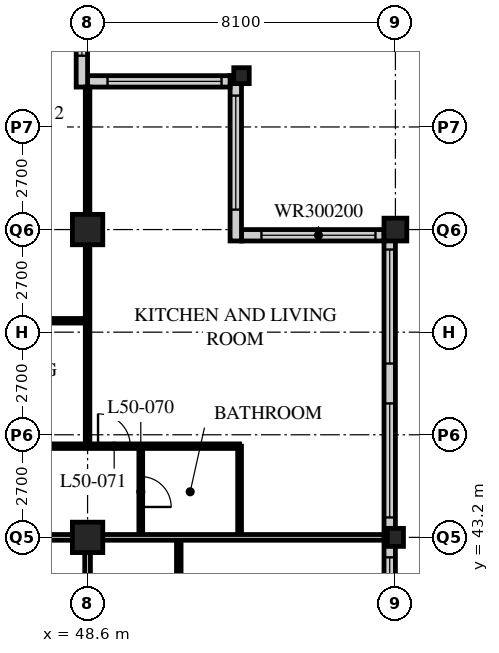
"""IFC4 building model, lengths in metres.
Left out: names, types, materials, properties, quantities, classifications, styles, units other than length and angle.
Written with IfcOpenShell. Run it as: python <this file> out.ifc"""

import sys

from ifc_helpers import new_model, si_unit, direction, frame, frame_2d, origin, origin_2d, place, context, subcontext, project, spatial, rectangle, hollow_rectangle, i_section, extrude, element, fill, save


model = new_model("IFC4")
c1 = context("Model", 3, precision=1e-05, world=origin(), true_north=direction((0.0, 1.0)))
c2 = subcontext(c1, "Body", "Model", "MODEL_VIEW")
j1 = project(units=[si_unit("LENGTHUNIT", "METRE"), si_unit("PLANEANGLEUNIT", "RADIAN")], contexts=[c1])
p1 = place(None, origin())
s1 = spatial("IfcSite", under=j1, at=p1, CompositionType="ELEMENT")
p2 = place(p1, origin())
s2 = spatial("IfcBuilding", under=s1, at=p2, CompositionType="ELEMENT")
p3 = place(p2, frame((0.0, 0.0, 195.6)))
s3 = spatial("IfcBuildingStorey", under=s2, at=p3, CompositionType="ELEMENT", Elevation=195.6)
for number, where, z_axis, x_axis in (
    (1, (48.6, 43.2, 0.0), (0.0, 0.0, 1.0), (1.0, 0.0, 0.0)),
    (2, (48.6, 51.3, 0.0), (0.0, 0.0, 1.0), (1.0, 0.0, 0.0)),
):
    element("IfcColumn", number, at=place(p3, frame(where, z_axis=z_axis, x_axis=x_axis)), inside=s3, PredefinedType="COLUMN", context=c2, shape_type="SweptSolid", body=[
        extrude(hollow_rectangle(XDim=0.8, YDim=0.8, WallThickness=0.08, at=origin_2d()), origin(), (0.0, 0.0, 1.0), 3.6),
    ])
p4 = place(p3, frame((52.65, 55.35, 0.0), z_axis=(0.0, 0.0, 1.0), x_axis=(1.0, 0.0, 0.0)))
e3 = element("IfcColumn", 3, at=p4, inside=s3, PredefinedType="COLUMN", context=c2, shape_type="SweptSolid", body=[
    extrude(i_section(OverallWidth=0.407, OverallDepth=0.419, WebThickness=0.031, FlangeThickness=0.049, FilletRadius=0.015, at=origin_2d()), origin(), (0.0, 0.0, 1.0), 3.6),
])
p5 = place(p3, frame((56.7, 43.2, 0.0), z_axis=(0.0, 0.0, 1.0), x_axis=(1.0, 0.0, 0.0)))
e4 = element("IfcColumn", 4, at=p5, inside=s3, PredefinedType="COLUMN", context=c2, shape_type="SweptSolid", body=[
    extrude(i_section(OverallWidth=0.424, OverallDepth=0.475, WebThickness=0.048, FlangeThickness=0.077, FilletRadius=0.015, at=origin_2d()), origin(), (0.0, 0.0, 1.0), 3.6),
])
p6 = place(p3, frame((56.7, 51.3, 0.0), z_axis=(0.0, 0.0, 1.0), x_axis=(1.0, 0.0, 0.0)))
e5 = element("IfcColumn", 5, at=p6, inside=s3, PredefinedType="COLUMN", context=c2, shape_type="SweptSolid", body=[
    extrude(hollow_rectangle(XDim=0.6, YDim=0.6, WallThickness=0.05, at=origin_2d()), origin(), (0.0, 0.0, 1.0), 3.6),
])
p7 = place(p3, frame((56.55, 19.2, 0.0), z_axis=(0.0, 0.0, 1.0), x_axis=(0.0, 1.0, 0.0)))
e6 = element("IfcWall", 6, at=p7, inside=s3, PredefinedType="SOLIDWALL", context=c2, shape_type="SweptSolid", body=[
    extrude(rectangle(XDim=32.1, YDim=0.3, at=frame_2d((16.05, 0.0))), origin(), (0.0, 0.0, 1.0), 3.39),
])
p8 = place(p7, frame((0.225, 0.0, 0.6)))
e7 = element("IfcOpeningElement", 7, at=p8, cuts=e6, PredefinedType="OPENING", context=c2, shape_type="SweptSolid", body=[
    extrude(rectangle(XDim=3.0, YDim=2.4, at=frame_2d((1.5, 1.2))), frame((0.0, 0.16, 0.0), z_axis=(0.0, -1.0, 0.0), x_axis=(1.0, 0.0, 0.0)), (0.0, 0.0, 1.0), 0.32),
])
p9 = place(p7, frame((4.275, 0.0, 0.6)))
e8 = element("IfcOpeningElement", 8, at=p9, cuts=e6, PredefinedType="OPENING", context=c2, shape_type="SweptSolid", body=[
    extrude(rectangle(XDim=3.0, YDim=2.4, at=frame_2d((1.5, 1.2))), frame((0.0, 0.16, 0.0), z_axis=(0.0, -1.0, 0.0), x_axis=(1.0, 0.0, 0.0)), (0.0, 0.0, 1.0), 0.32),
])
p10 = place(p7, frame((8.325, 0.0, 0.6)))
e9 = element("IfcOpeningElement", 9, at=p10, cuts=e6, PredefinedType="OPENING", context=c2, shape_type="SweptSolid", body=[
    extrude(rectangle(XDim=3.0, YDim=2.4, at=frame_2d((1.5, 1.2))), frame((0.0, 0.16, 0.0), z_axis=(0.0, -1.0, 0.0), x_axis=(1.0, 0.0, 0.0)), (0.0, 0.0, 1.0), 0.32),
])
p11 = place(p7, frame((12.375, 0.0, 0.6)))
e10 = element("IfcOpeningElement", 10, at=p11, cuts=e6, PredefinedType="OPENING", context=c2, shape_type="SweptSolid", body=[
    extrude(rectangle(XDim=3.0, YDim=2.4, at=frame_2d((1.5, 1.2))), frame((0.0, 0.16, 0.0), z_axis=(0.0, -1.0, 0.0), x_axis=(1.0, 0.0, 0.0)), (0.0, 0.0, 1.0), 0.32),
])
p12 = place(p7, frame((16.425, 0.0, 0.6)))
e11 = element("IfcOpeningElement", 11, at=p12, cuts=e6, PredefinedType="OPENING", context=c2, shape_type="SweptSolid", body=[
    extrude(rectangle(XDim=3.0, YDim=2.4, at=frame_2d((1.5, 1.2))), frame((0.0, 0.16, 0.0), z_axis=(0.0, -1.0, 0.0), x_axis=(1.0, 0.0, 0.0)), (0.0, 0.0, 1.0), 0.32),
])
p13 = place(p7, frame((20.475, 0.0, 0.6)))
e12 = element("IfcOpeningElement", 12, at=p13, cuts=e6, PredefinedType="OPENING", context=c2, shape_type="SweptSolid", body=[
    extrude(rectangle(XDim=3.0, YDim=2.4, at=frame_2d((1.5, 1.2))), frame((0.0, 0.16, 0.0), z_axis=(0.0, -1.0, 0.0), x_axis=(1.0, 0.0, 0.0)), (0.0, 0.0, 1.0), 0.32),
])
p14 = place(p7, frame((24.525, 0.0, 0.6)))
e13 = element("IfcOpeningElement", 13, at=p14, cuts=e6, PredefinedType="OPENING", context=c2, shape_type="SweptSolid", body=[
    extrude(rectangle(XDim=3.0, YDim=2.4, at=frame_2d((1.5, 1.2))), frame((0.0, 0.16, 0.0), z_axis=(0.0, -1.0, 0.0), x_axis=(1.0, 0.0, 0.0)), (0.0, 0.0, 1.0), 0.32),
])
p15 = place(p7, frame((28.575, 0.0, 0.6)))
e14 = element("IfcOpeningElement", 14, at=p15, cuts=e6, PredefinedType="OPENING", context=c2, shape_type="SweptSolid", body=[
    extrude(rectangle(XDim=3.0, YDim=2.4, at=frame_2d((1.5, 1.2))), frame((0.0, 0.16, 0.0), z_axis=(0.0, -1.0, 0.0), x_axis=(1.0, 0.0, 0.0)), (0.0, 0.0, 1.0), 0.32),
])
p16 = place(p3, frame((56.4, 51.15, 0.0), z_axis=(0.0, 0.0, 1.0), x_axis=(-1.0, 0.0, 0.0)))
e15 = element("IfcWall", 15, at=p16, inside=s3, PredefinedType="SOLIDWALL", context=c2, shape_type="SweptSolid", body=[
    extrude(rectangle(XDim=3.75, YDim=0.3, at=frame_2d((1.875, 0.0))), origin(), (0.0, 0.0, 1.0), 3.39),
])
p17 = place(p16, frame((0.225, 0.0, 0.6)))
e16 = element("IfcOpeningElement", 16, at=p17, cuts=e15, PredefinedType="OPENING", context=c2, shape_type="SweptSolid", body=[
    extrude(rectangle(XDim=3.0, YDim=2.0, at=frame_2d((1.5, 1.0))), frame((0.0, 0.16, 0.0), z_axis=(0.0, -1.0, 0.0), x_axis=(1.0, 0.0, 0.0)), (0.0, 0.0, 1.0), 0.32),
])
p18 = place(p3, frame((52.5, 51.0, 0.0), z_axis=(0.0, 0.0, 1.0), x_axis=(0.0, 1.0, 0.0)))
e17 = element("IfcWall", 17, at=p18, inside=s3, PredefinedType="SOLIDWALL", context=c2, shape_type="SweptSolid", body=[
    extrude(rectangle(XDim=4.35, YDim=0.3, at=frame_2d((2.175, 0.0))), origin(), (0.0, 0.0, 1.0), 3.39),
])
p19 = place(p18, frame((0.825, 0.0, 0.6)))
e18 = element("IfcOpeningElement", 18, at=p19, cuts=e17, PredefinedType="OPENING", context=c2, shape_type="SweptSolid", body=[
    extrude(rectangle(XDim=3.0, YDim=2.0, at=frame_2d((1.5, 1.0))), frame((0.0, 0.16, 0.0), z_axis=(0.0, -1.0, 0.0), x_axis=(1.0, 0.0, 0.0)), (0.0, 0.0, 1.0), 0.32),
])
p20 = place(p3, frame((52.35, 55.2, 0.0), z_axis=(0.0, 0.0, 1.0), x_axis=(-1.0, 0.0, 0.0)))
e19 = element("IfcWall", 19, at=p20, inside=s3, PredefinedType="SOLIDWALL", context=c2, shape_type="SweptSolid", body=[
    extrude(rectangle(XDim=3.75, YDim=0.3, at=frame_2d((1.875, 0.0))), origin(), (0.0, 0.0, 1.0), 3.39),
])
p21 = place(p20, frame((0.225, 0.0, 0.6)))
e20 = element("IfcOpeningElement", 20, at=p21, cuts=e19, PredefinedType="OPENING", context=c2, shape_type="SweptSolid", body=[
    extrude(rectangle(XDim=3.0, YDim=2.0, at=frame_2d((1.5, 1.0))), frame((0.0, 0.16, 0.0), z_axis=(0.0, -1.0, 0.0), x_axis=(1.0, 0.0, 0.0)), (0.0, 0.0, 1.0), 0.32),
])
p22 = place(p3, frame((48.45, 55.05, 0.0), z_axis=(0.0, 0.0, 1.0), x_axis=(0.0, 1.0, 0.0)))
e21 = element("IfcWall", 21, at=p22, inside=s3, PredefinedType="SOLIDWALL", context=c2, shape_type="SweptSolid", body=[
    extrude(rectangle(XDim=4.35, YDim=0.3, at=frame_2d((2.175, 0.0))), origin(), (0.0, 0.0, 1.0), 3.39),
])
p23 = place(p22, frame((0.825, 0.0, 0.6)))
e22 = element("IfcOpeningElement", 22, at=p23, cuts=e21, PredefinedType="OPENING", context=c2, shape_type="SweptSolid", body=[
    extrude(rectangle(XDim=3.0, YDim=2.0, at=frame_2d((1.5, 1.0))), frame((0.0, 0.16, 0.0), z_axis=(0.0, -1.0, 0.0), x_axis=(1.0, 0.0, 0.0)), (0.0, 0.0, 1.0), 0.32),
])
p24 = place(p3, frame((8.1, 43.2, 0.0), z_axis=(0.0, 0.0, 1.0), x_axis=(1.0, 0.0, 0.0)))
e23 = element("IfcWall", 23, at=p24, inside=s3, PredefinedType="PARTITIONING", context=c2, shape_type="SweptSolid", body=[
    extrude(rectangle(XDim=40.5, YDim=0.15, at=frame_2d((20.25, 0.0))), origin(), (0.0, 0.0, 1.0), 2.778),
])
p25 = place(p24, frame((4.45, 0.0, 0.0)))
e24 = element("IfcOpeningElement", 24, at=p25, cuts=e23, PredefinedType="OPENING", context=c2, shape_type="SweptSolid", body=[
    extrude(rectangle(XDim=1.0, YDim=2.1, at=frame_2d((0.5, 1.05))), frame((0.0, 0.085, 0.0), z_axis=(0.0, -1.0, 0.0), x_axis=(1.0, 0.0, 0.0)), (0.0, 0.0, 1.0), 0.17),
])
p26 = place(p24, frame((20.65, 0.0, 0.0)))
e25 = element("IfcOpeningElement", 25, at=p26, cuts=e23, PredefinedType="OPENING", context=c2, shape_type="SweptSolid", body=[
    extrude(rectangle(XDim=1.0, YDim=2.1, at=frame_2d((0.5, 1.05))), frame((0.0, 0.085, 0.0), z_axis=(0.0, -1.0, 0.0), x_axis=(1.0, 0.0, 0.0)), (0.0, 0.0, 1.0), 0.17),
])
p27 = place(p24, frame((28.75, 0.0, 0.0)))
e26 = element("IfcOpeningElement", 26, at=p27, cuts=e23, PredefinedType="OPENING", context=c2, shape_type="SweptSolid", body=[
    extrude(rectangle(XDim=1.0, YDim=2.1, at=frame_2d((0.5, 1.05))), frame((0.0, 0.085, 0.0), z_axis=(0.0, -1.0, 0.0), x_axis=(1.0, 0.0, 0.0)), (0.0, 0.0, 1.0), 0.17),
])
p28 = place(p24, frame((37.975, 0.0, 0.0)))
e27 = element("IfcOpeningElement", 27, at=p28, cuts=e23, PredefinedType="OPENING", context=c2, shape_type="SweptSolid", body=[
    extrude(rectangle(XDim=1.0, YDim=2.1, at=frame_2d((0.5, 1.05))), frame((0.0, 0.085, 0.0), z_axis=(0.0, -1.0, 0.0), x_axis=(1.0, 0.0, 0.0)), (0.0, 0.0, 1.0), 0.17),
])
p29 = place(p24, frame((1.525, 0.0, 0.0)))
e28 = element("IfcOpeningElement", 28, at=p29, cuts=e23, PredefinedType="OPENING", context=c2, shape_type="SweptSolid", body=[
    extrude(rectangle(XDim=1.0, YDim=2.1, at=frame_2d((0.5, 1.05))), frame((0.0, 0.085, 0.0), z_axis=(0.0, -1.0, 0.0), x_axis=(1.0, 0.0, 0.0)), (0.0, 0.0, 1.0), 0.17),
])
p30 = place(p3, frame((48.6, 18.9, 0.0), z_axis=(0.0, 0.0, 1.0), x_axis=(0.0, 1.0, 0.0)))
e29 = element("IfcWall", 29, at=p30, inside=s3, PredefinedType="PARTITIONING", context=c2, shape_type="SweptSolid", body=[
    extrude(rectangle(XDim=24.3, YDim=0.15, at=frame_2d((12.15, 0.0))), origin(), (0.0, 0.0, 1.0), 2.778),
])
p31 = place(p30, frame((2.35, 0.0, 0.0)))
e30 = element("IfcOpeningElement", 30, at=p31, cuts=e29, PredefinedType="OPENING", context=c2, shape_type="SweptSolid", body=[
    extrude(rectangle(XDim=1.0, YDim=2.1, at=frame_2d((0.5, 1.05))), frame((0.0, 0.085, 0.0), z_axis=(0.0, -1.0, 0.0), x_axis=(1.0, 0.0, 0.0)), (0.0, 0.0, 1.0), 0.17),
])
p32 = place(p30, frame((4.75, 0.0, 0.0)))
e31 = element("IfcOpeningElement", 31, at=p32, cuts=e29, PredefinedType="OPENING", context=c2, shape_type="SweptSolid", body=[
    extrude(rectangle(XDim=1.0, YDim=2.1, at=frame_2d((0.5, 1.05))), frame((0.0, 0.085, 0.0), z_axis=(0.0, -1.0, 0.0), x_axis=(1.0, 0.0, 0.0)), (0.0, 0.0, 1.0), 0.17),
])
p33 = place(p30, frame((9.0, 0.0, 0.0)))
e32 = element("IfcOpeningElement", 32, at=p33, cuts=e29, PredefinedType="OPENING", context=c2, shape_type="SweptSolid", body=[
    extrude(rectangle(XDim=1.0, YDim=2.1, at=frame_2d((0.5, 1.05))), frame((0.0, 0.085, 0.0), z_axis=(0.0, -1.0, 0.0), x_axis=(1.0, 0.0, 0.0)), (0.0, 0.0, 1.0), 0.17),
])
p34 = place(p3, frame((51.0, 27.0, 0.0), z_axis=(0.0, 0.0, 1.0), x_axis=(0.0, 1.0, 0.0)))
e33 = element("IfcWall", 33, at=p34, inside=s3, PredefinedType="PARTITIONING", context=c2, shape_type="SweptSolid", body=[
    extrude(rectangle(XDim=16.2, YDim=0.12, at=frame_2d((8.1, 0.0))), origin(), (0.0, 0.0, 1.0), 3.39),
])
p35 = place(p34, frame((0.975, 0.0, 0.0)))
e34 = element("IfcOpeningElement", 34, at=p35, cuts=e33, PredefinedType="OPENING", context=c2, shape_type="SweptSolid", body=[
    extrude(rectangle(XDim=0.85, YDim=2.1, at=frame_2d((0.425, 1.05))), frame((0.0, 0.07, 0.0), z_axis=(0.0, -1.0, 0.0), x_axis=(1.0, 0.0, 0.0)), (0.0, 0.0, 1.0), 0.14),
])
p36 = place(p34, frame((8.425, 0.0, 0.0)))
e35 = element("IfcOpeningElement", 35, at=p36, cuts=e33, PredefinedType="OPENING", context=c2, shape_type="SweptSolid", body=[
    extrude(rectangle(XDim=0.85, YDim=2.1, at=frame_2d((0.425, 1.05))), frame((0.0, 0.07, 0.0), z_axis=(0.0, -1.0, 0.0), x_axis=(1.0, 0.0, 0.0)), (0.0, 0.0, 1.0), 0.14),
])
p37 = place(p34, frame((12.475, 0.0, 0.0)))
e36 = element("IfcOpeningElement", 36, at=p37, cuts=e33, PredefinedType="OPENING", context=c2, shape_type="SweptSolid", body=[
    extrude(rectangle(XDim=0.85, YDim=2.1, at=frame_2d((0.425, 1.05))), frame((0.0, 0.07, 0.0), z_axis=(0.0, -1.0, 0.0), x_axis=(1.0, 0.0, 0.0)), (0.0, 0.0, 1.0), 0.14),
])
p38 = place(p3, frame((50.0, 43.2, 0.0), z_axis=(0.0, 0.0, 1.0), x_axis=(0.0, 1.0, 0.0)))
e37 = element("IfcWall", 37, at=p38, inside=s3, PredefinedType="PARTITIONING", context=c2, shape_type="SweptSolid", body=[
    extrude(rectangle(XDim=2.4, YDim=0.1, at=frame_2d((1.2, 0.0))), origin(), (0.0, 0.0, 1.0), 3.39),
])
p39 = place(p38, frame((0.8, 0.0, 0.0)))
e38 = element("IfcOpeningElement", 38, at=p39, cuts=e37, PredefinedType="OPENING", context=c2, shape_type="SweptSolid", body=[
    extrude(rectangle(XDim=0.8, YDim=2.1, at=frame_2d((0.4, 1.05))), frame((0.0, 0.06, 0.0), z_axis=(0.0, -1.0, 0.0), x_axis=(1.0, 0.0, 0.0)), (0.0, 0.0, 1.0), 0.12),
])
p40 = place(p3, frame((52.6, 43.2, 0.0), z_axis=(0.0, 0.0, 1.0), x_axis=(0.0, 1.0, 0.0)))
e39 = element("IfcWall", 39, at=p40, inside=s3, PredefinedType="PARTITIONING", context=c2, shape_type="SweptSolid", body=[
    extrude(rectangle(XDim=2.4, YDim=0.1, at=frame_2d((1.2, 0.0))), origin(), (0.0, 0.0, 1.0), 3.39),
])
p41 = place(p3, frame((48.6, 45.6, 0.0), z_axis=(0.0, 0.0, 1.0), x_axis=(0.0, 1.0, 0.0)))
e40 = element("IfcWall", 40, at=p41, inside=s3, PredefinedType="PARTITIONING", context=c2, shape_type="SweptSolid", body=[
    extrude(rectangle(XDim=9.45, YDim=0.12, at=frame_2d((4.725, 0.0))), origin(), (0.0, 0.0, 1.0), 2.778),
])
p42 = place(p3, frame((48.6, 43.2, 0.0), z_axis=(0.0, 0.0, 1.0), x_axis=(1.0, 0.0, 0.0)))
e41 = element("IfcWall", 41, at=p42, inside=s3, PredefinedType="PARTITIONING", context=c2, shape_type="SweptSolid", body=[
    extrude(rectangle(XDim=7.8, YDim=0.15, at=frame_2d((3.9, 0.0))), origin(), (0.0, 0.0, 1.0), 2.778),
])
p43 = place(p3, frame((4.1, 45.6, 0.0), z_axis=(0.0, 0.0, 1.0), x_axis=(1.0, 0.0, 0.0)))
e42 = element("IfcWall", 42, at=p43, inside=s3, PredefinedType="PARTITIONING", context=c2, shape_type="SweptSolid", body=[
    extrude(rectangle(XDim=48.5, YDim=0.12, at=frame_2d((24.25, 0.0))), origin(), (0.0, 0.0, 1.0), 3.39),
])
p44 = place(p43, frame((9.025, 0.0, 0.0)))
e43 = element("IfcOpeningElement", 43, at=p44, cuts=e42, PredefinedType="OPENING", context=c2, shape_type="SweptSolid", body=[
    extrude(rectangle(XDim=0.85, YDim=2.1, at=frame_2d((0.425, 1.05))), frame((0.0, 0.07, 0.0), z_axis=(0.0, -1.0, 0.0), x_axis=(1.0, 0.0, 0.0)), (0.0, 0.0, 1.0), 0.14),
])
p45 = place(p43, frame((16.475, 0.0, 0.0)))
e44 = element("IfcOpeningElement", 44, at=p45, cuts=e42, PredefinedType="OPENING", context=c2, shape_type="SweptSolid", body=[
    extrude(rectangle(XDim=0.85, YDim=2.1, at=frame_2d((0.425, 1.05))), frame((0.0, 0.07, 0.0), z_axis=(0.0, -1.0, 0.0), x_axis=(1.0, 0.0, 0.0)), (0.0, 0.0, 1.0), 0.14),
])
p46 = place(p43, frame((20.525, 0.0, 0.0)))
e45 = element("IfcOpeningElement", 45, at=p46, cuts=e42, PredefinedType="OPENING", context=c2, shape_type="SweptSolid", body=[
    extrude(rectangle(XDim=0.85, YDim=2.1, at=frame_2d((0.425, 1.05))), frame((0.0, 0.07, 0.0), z_axis=(0.0, -1.0, 0.0), x_axis=(1.0, 0.0, 0.0)), (0.0, 0.0, 1.0), 0.14),
])
p47 = place(p43, frame((25.225, 0.0, 0.0)))
e46 = element("IfcOpeningElement", 46, at=p47, cuts=e42, PredefinedType="OPENING", context=c2, shape_type="SweptSolid", body=[
    extrude(rectangle(XDim=0.85, YDim=2.1, at=frame_2d((0.425, 1.05))), frame((0.0, 0.07, 0.0), z_axis=(0.0, -1.0, 0.0), x_axis=(1.0, 0.0, 0.0)), (0.0, 0.0, 1.0), 0.14),
])
p48 = place(p43, frame((28.625, 0.0, 0.0)))
e47 = element("IfcOpeningElement", 47, at=p48, cuts=e42, PredefinedType="OPENING", context=c2, shape_type="SweptSolid", body=[
    extrude(rectangle(XDim=0.85, YDim=2.1, at=frame_2d((0.425, 1.05))), frame((0.0, 0.07, 0.0), z_axis=(0.0, -1.0, 0.0), x_axis=(1.0, 0.0, 0.0)), (0.0, 0.0, 1.0), 0.14),
])
p49 = place(p43, frame((33.325, 0.0, 0.0)))
e48 = element("IfcOpeningElement", 48, at=p49, cuts=e42, PredefinedType="OPENING", context=c2, shape_type="SweptSolid", body=[
    extrude(rectangle(XDim=0.85, YDim=2.1, at=frame_2d((0.425, 1.05))), frame((0.0, 0.07, 0.0), z_axis=(0.0, -1.0, 0.0), x_axis=(1.0, 0.0, 0.0)), (0.0, 0.0, 1.0), 0.14),
])
p50 = place(p43, frame((36.725, 0.0, 0.0)))
e49 = element("IfcOpeningElement", 49, at=p50, cuts=e42, PredefinedType="OPENING", context=c2, shape_type="SweptSolid", body=[
    extrude(rectangle(XDim=0.85, YDim=2.1, at=frame_2d((0.425, 1.05))), frame((0.0, 0.07, 0.0), z_axis=(0.0, -1.0, 0.0), x_axis=(1.0, 0.0, 0.0)), (0.0, 0.0, 1.0), 0.14),
])
p51 = place(p43, frame((40.925, 0.0, 0.0)))
e50 = element("IfcOpeningElement", 50, at=p51, cuts=e42, PredefinedType="OPENING", context=c2, shape_type="SweptSolid", body=[
    extrude(rectangle(XDim=0.85, YDim=2.1, at=frame_2d((0.425, 1.05))), frame((0.0, 0.07, 0.0), z_axis=(0.0, -1.0, 0.0), x_axis=(1.0, 0.0, 0.0)), (0.0, 0.0, 1.0), 0.14),
])
p52 = place(p43, frame((44.775, 0.0, 0.0)))
e51 = element("IfcOpeningElement", 51, at=p52, cuts=e42, PredefinedType="OPENING", context=c2, shape_type="SweptSolid", body=[
    extrude(rectangle(XDim=0.85, YDim=2.1, at=frame_2d((0.425, 1.05))), frame((0.0, 0.07, 0.0), z_axis=(0.0, -1.0, 0.0), x_axis=(1.0, 0.0, 0.0)), (0.0, 0.0, 1.0), 0.14),
])
p53 = place(p43, frame((6.725, 0.0, 0.0)))
e52 = element("IfcOpeningElement", 52, at=p53, cuts=e42, PredefinedType="OPENING", context=c2, shape_type="SweptSolid", body=[
    extrude(rectangle(XDim=0.85, YDim=2.1, at=frame_2d((0.425, 1.05))), frame((0.0, 0.07, 0.0), z_axis=(0.0, -1.0, 0.0), x_axis=(1.0, 0.0, 0.0)), (0.0, 0.0, 1.0), 0.14),
])
p54 = place(p43, frame((2.875, 0.0, 0.0)))
e53 = element("IfcOpeningElement", 53, at=p54, cuts=e42, PredefinedType="OPENING", context=c2, shape_type="SweptSolid", body=[
    extrude(rectangle(XDim=0.85, YDim=2.1, at=frame_2d((0.425, 1.05))), frame((0.0, 0.07, 0.0), z_axis=(0.0, -1.0, 0.0), x_axis=(1.0, 0.0, 0.0)), (0.0, 0.0, 1.0), 0.14),
])
p55 = place(p3, frame((40.5, 48.9, 0.0), z_axis=(0.0, 0.0, 1.0), x_axis=(1.0, 0.0, 0.0)))
e54 = element("IfcWall", 54, at=p55, inside=s3, PredefinedType="PARTITIONING", context=c2, shape_type="SweptSolid", body=[
    extrude(rectangle(XDim=8.1, YDim=0.12, at=frame_2d((4.05, 0.0))), origin(), (0.0, 0.0, 1.0), 3.39),
])
p56 = place(p55, frame((1.6, 0.0, 0.0)))
e55 = element("IfcOpeningElement", 55, at=p56, cuts=e54, PredefinedType="OPENING", context=c2, shape_type="SweptSolid", body=[
    extrude(rectangle(XDim=0.85, YDim=2.1, at=frame_2d((0.425, 1.05))), frame((0.0, 0.07, 0.0), z_axis=(0.0, -1.0, 0.0), x_axis=(1.0, 0.0, 0.0)), (0.0, 0.0, 1.0), 0.14),
])
p57 = place(p55, frame((5.65, 0.0, 0.0)))
e56 = element("IfcOpeningElement", 56, at=p57, cuts=e54, PredefinedType="OPENING", context=c2, shape_type="SweptSolid", body=[
    extrude(rectangle(XDim=0.85, YDim=2.1, at=frame_2d((0.425, 1.05))), frame((0.0, 0.07, 0.0), z_axis=(0.0, -1.0, 0.0), x_axis=(1.0, 0.0, 0.0)), (0.0, 0.0, 1.0), 0.14),
])
p58 = place(p13, origin())
e57 = element("IfcWindow", 57, at=p58, inside=s3, PartitioningType="SINGLE_PANEL", PredefinedType="WINDOW", context=c2, shape_type="SweptSolid", body=[
    extrude(rectangle(XDim=3.0, YDim=2.4, at=frame_2d((1.5, 1.2))), frame((0.0, 0.03, 0.0), z_axis=(0.0, -1.0, 0.0), x_axis=(1.0, 0.0, 0.0)), (0.0, 0.0, 1.0), 0.06),
])
fill(e12, e57)
p59 = place(p14, origin())
e58 = element("IfcWindow", 58, at=p59, inside=s3, PartitioningType="SINGLE_PANEL", PredefinedType="WINDOW", context=c2, shape_type="SweptSolid", body=[
    extrude(rectangle(XDim=3.0, YDim=2.4, at=frame_2d((1.5, 1.2))), frame((0.0, 0.03, 0.0), z_axis=(0.0, -1.0, 0.0), x_axis=(1.0, 0.0, 0.0)), (0.0, 0.0, 1.0), 0.06),
])
fill(e13, e58)
p60 = place(p15, origin())
e59 = element("IfcWindow", 59, at=p60, inside=s3, PartitioningType="SINGLE_PANEL", PredefinedType="WINDOW", context=c2, shape_type="SweptSolid", body=[
    extrude(rectangle(XDim=3.0, YDim=2.4, at=frame_2d((1.5, 1.2))), frame((0.0, 0.03, 0.0), z_axis=(0.0, -1.0, 0.0), x_axis=(1.0, 0.0, 0.0)), (0.0, 0.0, 1.0), 0.06),
])
fill(e14, e59)
p61 = place(p17, origin())
e60 = element("IfcWindow", 60, at=p61, inside=s3, PartitioningType="SINGLE_PANEL", PredefinedType="WINDOW", context=c2, shape_type="SweptSolid", body=[
    extrude(rectangle(XDim=3.0, YDim=2.0, at=frame_2d((1.5, 1.0))), frame((0.0, 0.03, 0.0), z_axis=(0.0, -1.0, 0.0), x_axis=(1.0, 0.0, 0.0)), (0.0, 0.0, 1.0), 0.06),
])
fill(e16, e60)
p62 = place(p19, origin())
e61 = element("IfcWindow", 61, at=p62, inside=s3, PartitioningType="SINGLE_PANEL", PredefinedType="WINDOW", context=c2, shape_type="SweptSolid", body=[
    extrude(rectangle(XDim=3.0, YDim=2.0, at=frame_2d((1.5, 1.0))), frame((0.0, 0.03, 0.0), z_axis=(0.0, -1.0, 0.0), x_axis=(1.0, 0.0, 0.0)), (0.0, 0.0, 1.0), 0.06),
])
fill(e18, e61)
p63 = place(p21, origin())
e62 = element("IfcWindow", 62, at=p63, inside=s3, PartitioningType="SINGLE_PANEL", PredefinedType="WINDOW", context=c2, shape_type="SweptSolid", body=[
    extrude(rectangle(XDim=3.0, YDim=2.0, at=frame_2d((1.5, 1.0))), frame((0.0, 0.03, 0.0), z_axis=(0.0, -1.0, 0.0), x_axis=(1.0, 0.0, 0.0)), (0.0, 0.0, 1.0), 0.06),
])
fill(e20, e62)
p64 = place(p23, origin())
e63 = element("IfcWindow", 63, at=p64, inside=s3, PartitioningType="SINGLE_PANEL", PredefinedType="WINDOW", context=c2, shape_type="SweptSolid", body=[
    extrude(rectangle(XDim=3.0, YDim=2.0, at=frame_2d((1.5, 1.0))), frame((0.0, 0.03, 0.0), z_axis=(0.0, -1.0, 0.0), x_axis=(1.0, 0.0, 0.0)), (0.0, 0.0, 1.0), 0.06),
])
fill(e22, e63)
p65 = place(p39, origin())
e64 = element("IfcDoor", 64, at=p65, inside=s3, OperationType="SINGLE_SWING_RIGHT", PredefinedType="DOOR", context=c2, shape_type="SweptSolid", body=[
    extrude(rectangle(XDim=0.8, YDim=2.1, at=frame_2d((0.4, 1.05))), frame((0.0, 0.025, 0.0), z_axis=(0.0, -1.0, 0.0), x_axis=(1.0, 0.0, 0.0)), (0.0, 0.0, 1.0), 0.05),
])
fill(e38, e64)
p66 = place(p52, origin())
e65 = element("IfcDoor", 65, at=p66, inside=s3, OperationType="SINGLE_SWING_LEFT", PredefinedType="DOOR", context=c2, shape_type="SweptSolid", body=[
    extrude(rectangle(XDim=0.85, YDim=2.1, at=frame_2d((0.425, 1.05))), frame((0.0, 0.025, 0.0), z_axis=(0.0, -1.0, 0.0), x_axis=(1.0, 0.0, 0.0)), (0.0, 0.0, 1.0), 0.05),
])
fill(e51, e65)
save(model, sys.argv[1])
